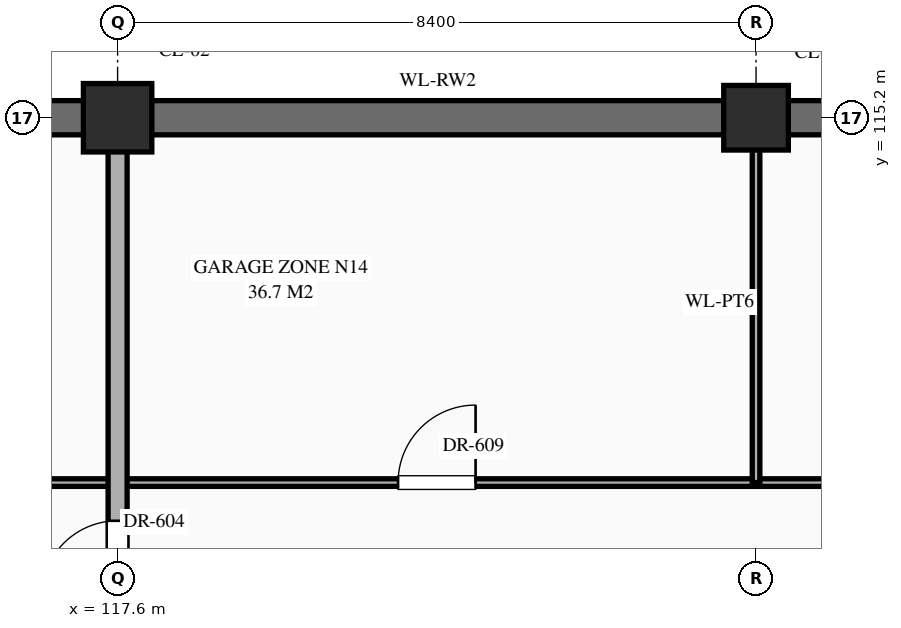
"""IFC4 building model, lengths in metres.
Left out: names, types, materials, properties, quantities, classifications, styles, units other than length and angle.
Written with IfcOpenShell. Run it as: python <this file> out.ifc"""

import sys

from ifc_helpers import new_model, si_unit, direction, frame, frame_2d, origin, origin_2d, place, context, subcontext, project, spatial, rectangle, extrude, element, fill, save


model = new_model("IFC4")
c1 = context("Model", 3, precision=1e-05, world=origin(), true_north=direction((0.0, 1.0)))
c2 = subcontext(c1, "Body", "Model", "MODEL_VIEW")
j1 = project(units=[si_unit("LENGTHUNIT", "METRE"), si_unit("PLANEANGLEUNIT", "RADIAN")], contexts=[c1])
p1 = place(None, origin())
s1 = spatial("IfcSite", under=j1, at=p1, CompositionType="ELEMENT")
p2 = place(p1, origin())
s2 = spatial("IfcBuilding", under=s1, at=p2, CompositionType="ELEMENT")
p3 = place(p2, frame((0.0, 0.0, -5.4)))
s3 = spatial("IfcBuildingStorey", under=s2, at=p3, CompositionType="ELEMENT", Elevation=-5.4)
p4 = place(p3, frame((117.6, 115.2, 0.0), z_axis=(0.0, 0.0, 1.0), x_axis=(1.0, 0.0, 0.0)))
e1 = element("IfcColumn", 1, at=p4, inside=s3, PredefinedType="COLUMN", context=c2, shape_type="SweptSolid", body=[
    extrude(rectangle(XDim=0.9, YDim=0.9, at=origin_2d()), origin(), (0.0, 0.0, 1.0), 5.4),
])
p5 = place(p3, frame((126.0, 115.2, 0.0), z_axis=(0.0, 0.0, 1.0), x_axis=(1.0, 0.0, 0.0)))
e2 = element("IfcColumn", 2, at=p5, inside=s3, PredefinedType="COLUMN", context=c2, shape_type="SweptSolid", body=[
    extrude(rectangle(XDim=0.85, YDim=0.85, at=origin_2d()), origin(), (0.0, 0.0, 1.0), 5.4),
])
p6 = place(p3, frame((109.645, 115.2, 0.0), z_axis=(0.0, 0.0, 1.0), x_axis=(1.0, 0.0, 0.0)))
e3 = element("IfcWall", 3, at=p6, inside=s3, PredefinedType="USERDEFINED", context=c2, shape_type="SweptSolid", body=[
    extrude(rectangle(XDim=7.51, YDim=0.45, at=frame_2d((3.755, 0.0))), origin(), (0.0, 0.0, 1.0), 5.1),
])
p7 = place(p3, frame((118.045, 115.2, 0.0), z_axis=(0.0, 0.0, 1.0), x_axis=(1.0, 0.0, 0.0)))
e4 = element("IfcWall", 4, at=p7, inside=s3, PredefinedType="USERDEFINED", context=c2, shape_type="SweptSolid", body=[
    extrude(rectangle(XDim=7.535, YDim=0.45, at=frame_2d((3.768, 0.0))), origin(), (0.0, 0.0, 1.0), 4.98),
])
p8 = place(p3, frame((126.42, 115.2, 0.0), z_axis=(0.0, 0.0, 1.0), x_axis=(1.0, 0.0, 0.0)))
e5 = element("IfcWall", 5, at=p8, inside=s3, PredefinedType="USERDEFINED", context=c2, shape_type="SweptSolid", body=[
    extrude(rectangle(XDim=7.56, YDim=0.45, at=frame_2d((3.78, 0.0))), origin(), (0.0, 0.0, 1.0), 4.98),
])
p9 = place(p3, frame((0.04, 110.4, 0.0), z_axis=(0.0, 0.0, 1.0), x_axis=(1.0, 0.0, 0.0)))
e6 = element("IfcWall", 6, at=p9, inside=s3, PredefinedType="STANDARD", context=c2, shape_type="SweptSolid", body=[
    extrude(rectangle(XDim=167.92, YDim=0.1, at=frame_2d((83.96, 0.0))), origin(), (0.0, 0.0, 1.0), 5.1),
])
p10 = place(p9, frame((3.65, 0.0, 0.0)))
e7 = element("IfcOpeningElement", 7, at=p10, cuts=e6, PredefinedType="OPENING", context=c2, shape_type="SweptSolid", body=[
    extrude(rectangle(XDim=1.06, YDim=2.4, at=frame_2d((0.53, 1.2))), frame((0.0, 0.062, 0.0), z_axis=(0.0, -1.0, 0.0), x_axis=(1.0, 0.0, 0.0)), (0.0, 0.0, 1.0), 0.124),
])
p11 = place(p9, frame((11.99, 0.0, 0.0)))
e8 = element("IfcOpeningElement", 8, at=p11, cuts=e6, PredefinedType="OPENING", context=c2, shape_type="SweptSolid", body=[
    extrude(rectangle(XDim=1.14, YDim=2.4, at=frame_2d((0.57, 1.2))), frame((0.0, 0.062, 0.0), z_axis=(0.0, -1.0, 0.0), x_axis=(1.0, 0.0, 0.0)), (0.0, 0.0, 1.0), 0.124),
])
p12 = place(p9, frame((20.51, 0.0, 0.0)))
e9 = element("IfcOpeningElement", 9, at=p12, cuts=e6, PredefinedType="OPENING", context=c2, shape_type="SweptSolid", body=[
    extrude(rectangle(XDim=0.9, YDim=2.15, at=frame_2d((0.45, 1.075))), frame((0.0, 0.062, 0.0), z_axis=(0.0, -1.0, 0.0), x_axis=(1.0, 0.0, 0.0)), (0.0, 0.0, 1.0), 0.124),
])
p13 = place(p9, frame((28.93, 0.0, 0.0)))
e10 = element("IfcOpeningElement", 10, at=p13, cuts=e6, PredefinedType="OPENING", context=c2, shape_type="SweptSolid", body=[
    extrude(rectangle(XDim=0.86, YDim=2.1, at=frame_2d((0.43, 1.05))), frame((0.0, 0.062, 0.0), z_axis=(0.0, -1.0, 0.0), x_axis=(1.0, 0.0, 0.0)), (0.0, 0.0, 1.0), 0.124),
])
p14 = place(p9, frame((37.3, 0.0, 0.0)))
e11 = element("IfcOpeningElement", 11, at=p14, cuts=e6, PredefinedType="OPENING", context=c2, shape_type="SweptSolid", body=[
    extrude(rectangle(XDim=0.92, YDim=2.15, at=frame_2d((0.46, 1.075))), frame((0.0, 0.062, 0.0), z_axis=(0.0, -1.0, 0.0), x_axis=(1.0, 0.0, 0.0)), (0.0, 0.0, 1.0), 0.124),
])
p15 = place(p9, frame((45.68, 0.0, 0.0)))
e12 = element("IfcOpeningElement", 12, at=p15, cuts=e6, PredefinedType="OPENING", context=c2, shape_type="SweptSolid", body=[
    extrude(rectangle(XDim=0.96, YDim=2.2, at=frame_2d((0.48, 1.1))), frame((0.0, 0.062, 0.0), z_axis=(0.0, -1.0, 0.0), x_axis=(1.0, 0.0, 0.0)), (0.0, 0.0, 1.0), 0.124),
])
p16 = place(p9, frame((54.04, 0.0, 0.0)))
e13 = element("IfcOpeningElement", 13, at=p16, cuts=e6, PredefinedType="OPENING", context=c2, shape_type="SweptSolid", body=[
    extrude(rectangle(XDim=1.04, YDim=2.2, at=frame_2d((0.52, 1.1))), frame((0.0, 0.062, 0.0), z_axis=(0.0, -1.0, 0.0), x_axis=(1.0, 0.0, 0.0)), (0.0, 0.0, 1.0), 0.124),
])
p17 = place(p9, frame((62.42, 0.0, 0.0)))
e14 = element("IfcOpeningElement", 14, at=p17, cuts=e6, PredefinedType="OPENING", context=c2, shape_type="SweptSolid", body=[
    extrude(rectangle(XDim=1.08, YDim=2.25, at=frame_2d((0.54, 1.125))), frame((0.0, 0.062, 0.0), z_axis=(0.0, -1.0, 0.0), x_axis=(1.0, 0.0, 0.0)), (0.0, 0.0, 1.0), 0.124),
])
p18 = place(p9, frame((70.8, 0.0, 0.0)))
e15 = element("IfcOpeningElement", 15, at=p18, cuts=e6, PredefinedType="OPENING", context=c2, shape_type="SweptSolid", body=[
    extrude(rectangle(XDim=1.12, YDim=2.25, at=frame_2d((0.56, 1.125))), frame((0.0, 0.062, 0.0), z_axis=(0.0, -1.0, 0.0), x_axis=(1.0, 0.0, 0.0)), (0.0, 0.0, 1.0), 0.124),
])
p19 = place(p9, frame((79.18, 0.0, 0.0)))
e16 = element("IfcOpeningElement", 16, at=p19, cuts=e6, PredefinedType="OPENING", context=c2, shape_type="SweptSolid", body=[
    extrude(rectangle(XDim=1.16, YDim=2.3, at=frame_2d((0.58, 1.15))), frame((0.0, 0.062, 0.0), z_axis=(0.0, -1.0, 0.0), x_axis=(1.0, 0.0, 0.0)), (0.0, 0.0, 1.0), 0.124),
])
p20 = place(p9, frame((87.54, 0.0, 0.0)))
e17 = element("IfcOpeningElement", 17, at=p20, cuts=e6, PredefinedType="OPENING", context=c2, shape_type="SweptSolid", body=[
    extrude(rectangle(XDim=1.24, YDim=2.3, at=frame_2d((0.62, 1.15))), frame((0.0, 0.062, 0.0), z_axis=(0.0, -1.0, 0.0), x_axis=(1.0, 0.0, 0.0)), (0.0, 0.0, 1.0), 0.124),
])
p21 = place(p9, frame((95.92, 0.0, 0.0)))
e18 = element("IfcOpeningElement", 18, at=p21, cuts=e6, PredefinedType="OPENING", context=c2, shape_type="SweptSolid", body=[
    extrude(rectangle(XDim=1.28, YDim=2.35, at=frame_2d((0.64, 1.175))), frame((0.0, 0.062, 0.0), z_axis=(0.0, -1.0, 0.0), x_axis=(1.0, 0.0, 0.0)), (0.0, 0.0, 1.0), 0.124),
])
p22 = place(p9, frame((104.49, 0.0, 0.0)))
e19 = element("IfcOpeningElement", 19, at=p22, cuts=e6, PredefinedType="OPENING", context=c2, shape_type="SweptSolid", body=[
    extrude(rectangle(XDim=0.94, YDim=2.3, at=frame_2d((0.47, 1.15))), frame((0.0, 0.062, 0.0), z_axis=(0.0, -1.0, 0.0), x_axis=(1.0, 0.0, 0.0)), (0.0, 0.0, 1.0), 0.124),
])
p23 = place(p9, frame((112.87, 0.0, 0.0)))
e20 = element("IfcOpeningElement", 20, at=p23, cuts=e6, PredefinedType="OPENING", context=c2, shape_type="SweptSolid", body=[
    extrude(rectangle(XDim=0.98, YDim=2.35, at=frame_2d((0.49, 1.175))), frame((0.0, 0.062, 0.0), z_axis=(0.0, -1.0, 0.0), x_axis=(1.0, 0.0, 0.0)), (0.0, 0.0, 1.0), 0.124),
])
p24 = place(p9, frame((121.25, 0.0, 0.0)))
e21 = element("IfcOpeningElement", 21, at=p24, cuts=e6, PredefinedType="OPENING", context=c2, shape_type="SweptSolid", body=[
    extrude(rectangle(XDim=1.02, YDim=2.4, at=frame_2d((0.51, 1.2))), frame((0.0, 0.062, 0.0), z_axis=(0.0, -1.0, 0.0), x_axis=(1.0, 0.0, 0.0)), (0.0, 0.0, 1.0), 0.124),
])
p25 = place(p9, frame((129.63, 0.0, 0.0)))
e22 = element("IfcOpeningElement", 22, at=p25, cuts=e6, PredefinedType="OPENING", context=c2, shape_type="SweptSolid", body=[
    extrude(rectangle(XDim=1.06, YDim=2.4, at=frame_2d((0.53, 1.2))), frame((0.0, 0.062, 0.0), z_axis=(0.0, -1.0, 0.0), x_axis=(1.0, 0.0, 0.0)), (0.0, 0.0, 1.0), 0.124),
])
p26 = place(p9, frame((137.99, 0.0, 0.0)))
e23 = element("IfcOpeningElement", 23, at=p26, cuts=e6, PredefinedType="OPENING", context=c2, shape_type="SweptSolid", body=[
    extrude(rectangle(XDim=1.14, YDim=2.4, at=frame_2d((0.57, 1.2))), frame((0.0, 0.062, 0.0), z_axis=(0.0, -1.0, 0.0), x_axis=(1.0, 0.0, 0.0)), (0.0, 0.0, 1.0), 0.124),
])
p27 = place(p9, frame((146.51, 0.0, 0.0)))
e24 = element("IfcOpeningElement", 24, at=p27, cuts=e6, PredefinedType="OPENING", context=c2, shape_type="SweptSolid", body=[
    extrude(rectangle(XDim=0.9, YDim=2.15, at=frame_2d((0.45, 1.075))), frame((0.0, 0.062, 0.0), z_axis=(0.0, -1.0, 0.0), x_axis=(1.0, 0.0, 0.0)), (0.0, 0.0, 1.0), 0.124),
])
p28 = place(p9, frame((154.93, 0.0, 0.0)))
e25 = element("IfcOpeningElement", 25, at=p28, cuts=e6, PredefinedType="OPENING", context=c2, shape_type="SweptSolid", body=[
    extrude(rectangle(XDim=0.86, YDim=2.1, at=frame_2d((0.43, 1.05))), frame((0.0, 0.062, 0.0), z_axis=(0.0, -1.0, 0.0), x_axis=(1.0, 0.0, 0.0)), (0.0, 0.0, 1.0), 0.124),
])
p29 = place(p9, frame((163.28, 0.0, 0.0)))
e26 = element("IfcOpeningElement", 26, at=p29, cuts=e6, PredefinedType="OPENING", context=c2, shape_type="SweptSolid", body=[
    extrude(rectangle(XDim=0.92, YDim=2.15, at=frame_2d((0.46, 1.075))), frame((0.0, 0.062, 0.0), z_axis=(0.0, -1.0, 0.0), x_axis=(1.0, 0.0, 0.0)), (0.0, 0.0, 1.0), 0.124),
])
p30 = place(p3, frame((117.6, 108.0, 0.0), z_axis=(0.0, 0.0, 1.0), x_axis=(0.0, 1.0, 0.0)))
e27 = element("IfcWall", 27, at=p30, inside=s3, PredefinedType="STANDARD", context=c2, shape_type="SweptSolid", body=[
    extrude(rectangle(XDim=7.16, YDim=0.25, at=frame_2d((3.58, 0.0))), origin(), (0.0, 0.0, 1.0), 4.23),
])
p31 = place(p30, frame((0.897, 0.0, 0.0)))
e28 = element("IfcOpeningElement", 28, at=p31, cuts=e27, PredefinedType="OPENING", context=c2, shape_type="SweptSolid", body=[
    extrude(rectangle(XDim=1.0, YDim=2.2, at=frame_2d((0.5, 1.1))), frame((0.0, 0.137, 0.0), z_axis=(0.0, -1.0, 0.0), x_axis=(1.0, 0.0, 0.0)), (0.0, 0.0, 1.0), 0.274),
])
p32 = place(p3, frame((126.0, 110.4, 0.0), z_axis=(0.0, 0.0, 1.0), x_axis=(0.0, 1.0, 0.0)))
e29 = element("IfcWall", 29, at=p32, inside=s3, PredefinedType="STANDARD", context=c2, shape_type="SweptSolid", body=[
    extrude(rectangle(XDim=4.76, YDim=0.1, at=frame_2d((2.38, 0.0))), origin(), (0.0, 0.0, 1.0), 4.23),
])
p33 = place(p31, origin())
e30 = element("IfcDoor", 30, at=p33, inside=s3, OperationType="SINGLE_SWING_LEFT", PredefinedType="DOOR", context=c2, shape_type="SweptSolid", body=[
    extrude(rectangle(XDim=1.0, YDim=2.2, at=frame_2d((0.5, 1.1))), frame((0.0, 0.025, 0.0), z_axis=(0.0, -1.0, 0.0), x_axis=(1.0, 0.0, 0.0)), (0.0, 0.0, 1.0), 0.05),
])
fill(e28, e30)
p34 = place(p24, origin())
e31 = element("IfcDoor", 31, at=p34, inside=s3, OperationType="SINGLE_SWING_RIGHT", PredefinedType="DOOR", context=c2, shape_type="SweptSolid", body=[
    extrude(rectangle(XDim=1.02, YDim=2.4, at=frame_2d((0.51, 1.2))), frame((0.0, 0.025, 0.0), z_axis=(0.0, -1.0, 0.0), x_axis=(1.0, 0.0, 0.0)), (0.0, 0.0, 1.0), 0.05),
])
fill(e21, e31)
save(model, sys.argv[1])
